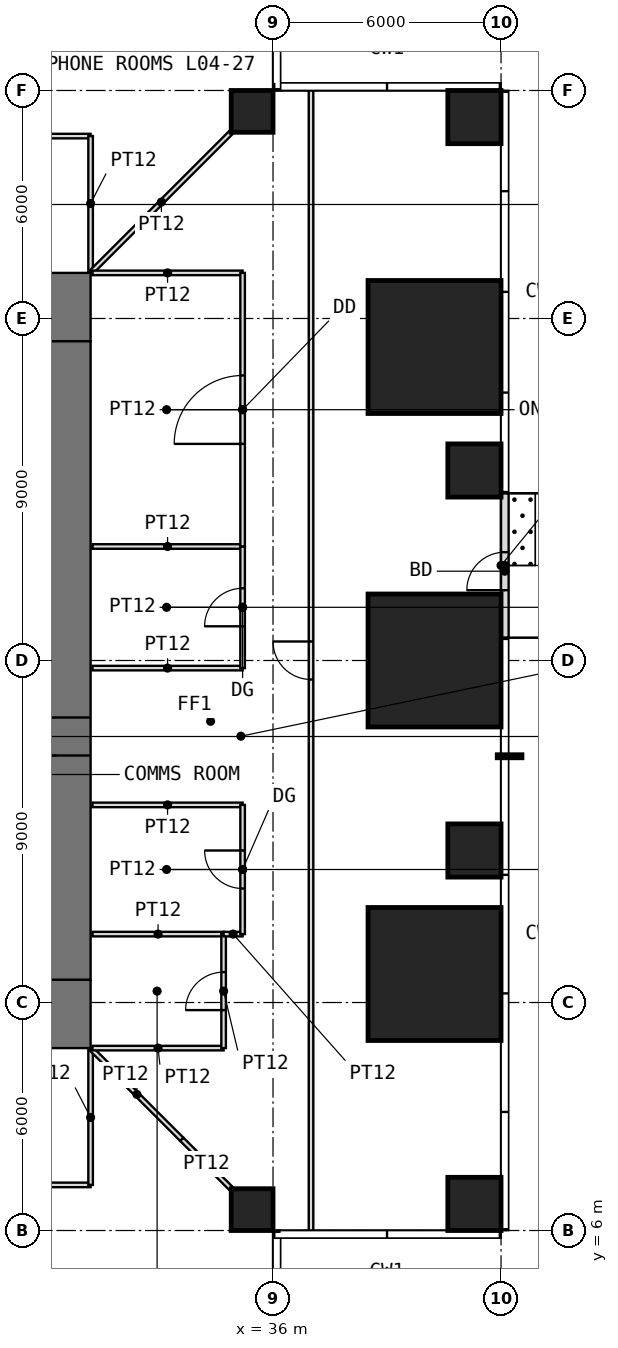
"""IFC4 building model, lengths in metres.
Left out: names, types, materials, properties, quantities, classifications, styles, units other than length and angle.
Written with IfcOpenShell. Run it as: python <this file> out.ifc"""

import sys

from ifc_helpers import new_model, si_unit, direction, frame, frame_2d, origin, origin_2d, place, context, subcontext, project, spatial, rectangle, extrude, element, fill, save


model = new_model("IFC4")
c1 = context("Model", 3, precision=1e-05, world=origin(), true_north=direction((0.0, 1.0)))
c2 = subcontext(c1, "Body", "Model", "MODEL_VIEW")
j1 = project(units=[si_unit("LENGTHUNIT", "METRE"), si_unit("PLANEANGLEUNIT", "RADIAN")], contexts=[c1])
p1 = place(None, origin())
s1 = spatial("IfcSite", under=j1, at=p1, CompositionType="ELEMENT")
p2 = place(p1, origin())
s2 = spatial("IfcBuilding", under=s1, at=p2, CompositionType="ELEMENT")
p3 = place(p2, frame((0.0, 0.0, 22.5)))
s3 = spatial("IfcBuildingStorey", under=s2, at=p3, CompositionType="ELEMENT", Elevation=22.5)
p4 = place(p3, frame((35.45, 6.55, 0.0), z_axis=(0.0, 0.0, 1.0), x_axis=(1.0, 0.0, 0.0)))
e1 = element("IfcColumn", 1, at=p4, inside=s3, PredefinedType="COLUMN", context=c2, shape_type="SweptSolid", body=[
    extrude(rectangle(XDim=1.1, YDim=1.1, at=origin_2d()), origin(), (0.0, 0.0, 1.0), 4.0),
])
p5 = place(p3, frame((41.3, 6.7, 0.0), z_axis=(0.0, 0.0, 1.0), x_axis=(1.0, 0.0, 0.0)))
e2 = element("IfcColumn", 2, at=p5, inside=s3, PredefinedType="COLUMN", context=c2, shape_type="SweptSolid", body=[
    extrude(rectangle(XDim=1.4, YDim=1.4, at=origin_2d()), origin(), (0.0, 0.0, 1.0), 4.0),
])
p6 = place(p3, frame((40.25, 12.75, 0.0), z_axis=(0.0, 0.0, 1.0), x_axis=(1.0, 0.0, 0.0)))
e3 = element("IfcColumn", 3, at=p6, inside=s3, PredefinedType="COLUMN", context=c2, shape_type="SweptSolid", body=[
    extrude(rectangle(XDim=3.5, YDim=3.5, at=origin_2d()), origin(), (0.0, 0.0, 1.0), 4.0),
])
p7 = place(p3, frame((41.3, 16.0, 0.0), z_axis=(0.0, 0.0, 1.0), x_axis=(1.0, 0.0, 0.0)))
e4 = element("IfcColumn", 4, at=p7, inside=s3, PredefinedType="COLUMN", context=c2, shape_type="SweptSolid", body=[
    extrude(rectangle(XDim=1.4, YDim=1.4, at=origin_2d()), origin(), (0.0, 0.0, 1.0), 4.0),
])
p8 = place(p3, frame((40.25, 21.0, 0.0), z_axis=(0.0, 0.0, 1.0), x_axis=(1.0, 0.0, 0.0)))
e5 = element("IfcColumn", 5, at=p8, inside=s3, PredefinedType="COLUMN", context=c2, shape_type="SweptSolid", body=[
    extrude(rectangle(XDim=3.5, YDim=3.5, at=origin_2d()), origin(), (0.0, 0.0, 1.0), 4.0),
])
p9 = place(p3, frame((41.3, 26.0, 0.0), z_axis=(0.0, 0.0, 1.0), x_axis=(1.0, 0.0, 0.0)))
e6 = element("IfcColumn", 6, at=p9, inside=s3, PredefinedType="COLUMN", context=c2, shape_type="SweptSolid", body=[
    extrude(rectangle(XDim=1.4, YDim=1.4, at=origin_2d()), origin(), (0.0, 0.0, 1.0), 4.0),
])
p10 = place(p3, frame((40.25, 29.25, 0.0), z_axis=(0.0, 0.0, 1.0), x_axis=(1.0, 0.0, 0.0)))
e7 = element("IfcColumn", 7, at=p10, inside=s3, PredefinedType="COLUMN", context=c2, shape_type="SweptSolid", body=[
    extrude(rectangle(XDim=3.5, YDim=3.5, at=origin_2d()), origin(), (0.0, 0.0, 1.0), 4.0),
])
p11 = place(p3, frame((35.45, 35.45, 0.0), z_axis=(0.0, 0.0, 1.0), x_axis=(1.0, 0.0, 0.0)))
e8 = element("IfcColumn", 8, at=p11, inside=s3, PredefinedType="COLUMN", context=c2, shape_type="SweptSolid", body=[
    extrude(rectangle(XDim=1.1, YDim=1.1, at=origin_2d()), origin(), (0.0, 0.0, 1.0), 4.0),
])
p12 = place(p3, frame((41.3, 35.3, 0.0), z_axis=(0.0, 0.0, 1.0), x_axis=(1.0, 0.0, 0.0)))
e9 = element("IfcColumn", 9, at=p12, inside=s3, PredefinedType="COLUMN", context=c2, shape_type="SweptSolid", body=[
    extrude(rectangle(XDim=1.4, YDim=1.4, at=origin_2d()), origin(), (0.0, 0.0, 1.0), 4.0),
])
p13 = place(p3, frame((42.1, 21.6, 0.0), z_axis=(0.0, 0.0, 1.0), x_axis=(0.0, 1.0, 0.0)))
e10 = element("IfcWall", 10, at=p13, inside=s3, PredefinedType="USERDEFINED", context=c2, shape_type="SweptSolid", body=[
    extrude(rectangle(XDim=3.8, YDim=0.2, at=frame_2d((1.9, 0.0))), origin(), (0.0, 0.0, 1.0), 3.75),
])
p14 = place(p13, frame((1.25, 0.0, 0.0)))
e11 = element("IfcOpeningElement", 11, at=p14, cuts=e10, PredefinedType="OPENING", context=c2, shape_type="SweptSolid", body=[
    extrude(rectangle(XDim=1.0, YDim=2.4, at=frame_2d((0.5, 1.2))), frame((0.0, 0.11, 0.0), z_axis=(0.0, -1.0, 0.0), x_axis=(1.0, 0.0, 0.0)), (0.0, 0.0, 1.0), 0.22),
])
p15 = place(p3, frame((10.8, 11.7, -0.05), z_axis=(0.0, 0.0, 1.0), x_axis=(1.0, 0.0, 0.0)))
e12 = element("IfcWall", 12, at=p15, inside=s3, PredefinedType="SHEAR", context=c2, shape_type="SweptSolid", body=[
    extrude(rectangle(XDim=20.4, YDim=1.8, at=frame_2d((10.2, 0.0))), origin(), (0.0, 0.0, 1.0), 4.0),
])
p16 = place(p15, frame((9.2, 0.0, 0.05)))
e13 = element("IfcOpeningElement", 13, at=p16, cuts=e12, PredefinedType="OPENING", context=c2, shape_type="SweptSolid", body=[
    extrude(rectangle(XDim=2.0, YDim=2.2, at=frame_2d((1.0, 1.1))), frame((0.0, 0.91, 0.0), z_axis=(0.0, -1.0, 0.0), x_axis=(1.0, 0.0, 0.0)), (0.0, 0.0, 1.0), 1.82),
])
p17 = place(p3, frame((10.8, 30.3, -0.05), z_axis=(0.0, 0.0, 1.0), x_axis=(1.0, 0.0, 0.0)))
e14 = element("IfcWall", 14, at=p17, inside=s3, PredefinedType="SHEAR", context=c2, shape_type="SweptSolid", body=[
    extrude(rectangle(XDim=20.4, YDim=1.8, at=frame_2d((10.2, 0.0))), origin(), (0.0, 0.0, 1.0), 4.0),
])
p18 = place(p17, frame((9.2, 0.0, 0.05)))
e15 = element("IfcOpeningElement", 15, at=p18, cuts=e14, PredefinedType="OPENING", context=c2, shape_type="SweptSolid", body=[
    extrude(rectangle(XDim=2.0, YDim=2.2, at=frame_2d((1.0, 1.1))), frame((0.0, 0.91, 0.0), z_axis=(0.0, -1.0, 0.0), x_axis=(1.0, 0.0, 0.0)), (0.0, 0.0, 1.0), 1.82),
])
p19 = place(p3, frame((30.3, 12.6, -0.05), z_axis=(0.0, 0.0, 1.0), x_axis=(0.0, 1.0, 0.0)))
e16 = element("IfcWall", 16, at=p19, inside=s3, PredefinedType="SHEAR", context=c2, shape_type="SweptSolid", body=[
    extrude(rectangle(XDim=16.8, YDim=1.8, at=frame_2d((8.4, 0.0))), origin(), (0.0, 0.0, 1.0), 4.0),
])
p20 = place(p19, frame((5.9, 0.0, 0.05)))
e17 = element("IfcOpeningElement", 17, at=p20, cuts=e16, PredefinedType="OPENING", context=c2, shape_type="SweptSolid", body=[
    extrude(rectangle(XDim=1.0, YDim=2.2, at=frame_2d((0.5, 1.1))), frame((0.0, 0.91, 0.0), z_axis=(0.0, -1.0, 0.0), x_axis=(1.0, 0.0, 0.0)), (0.0, 0.0, 1.0), 1.82),
])
p21 = place(p3, frame((23.6, 7.2, 0.0), z_axis=(0.0, 0.0, 1.0), x_axis=(1.0, 0.0, 0.0)))
e18 = element("IfcWall", 18, at=p21, inside=s3, PredefinedType="PARTITIONING", context=c2, shape_type="SweptSolid", body=[
    extrude(rectangle(XDim=7.6, YDim=0.12, at=frame_2d((3.8, 0.0))), origin(), (0.0, 0.0, 1.0), 3.75),
])
p22 = place(p21, frame((2.9, 0.0, 0.0)))
e19 = element("IfcOpeningElement", 19, at=p22, cuts=e18, PredefinedType="OPENING", context=c2, shape_type="SweptSolid", body=[
    extrude(rectangle(XDim=1.8, YDim=2.4, at=frame_2d((0.9, 1.2))), frame((0.0, 0.07, 0.0), z_axis=(0.0, -1.0, 0.0), x_axis=(1.0, 0.0, 0.0)), (0.0, 0.0, 1.0), 0.14),
])
p23 = place(p3, frame((27.0, 34.8, 0.0), z_axis=(0.0, 0.0, 1.0), x_axis=(1.0, 0.0, 0.0)))
e20 = element("IfcWall", 20, at=p23, inside=s3, PredefinedType="PARTITIONING", context=c2, shape_type="SweptSolid", body=[
    extrude(rectangle(XDim=4.2, YDim=0.12, at=frame_2d((2.1, 0.0))), origin(), (0.0, 0.0, 1.0), 3.75),
])
p24 = place(p23, frame((1.6, 0.0, 0.0)))
e21 = element("IfcOpeningElement", 21, at=p24, cuts=e20, PredefinedType="OPENING", context=c2, shape_type="SweptSolid", body=[
    extrude(rectangle(XDim=1.0, YDim=2.4, at=frame_2d((0.5, 1.2))), frame((0.0, 0.07, 0.0), z_axis=(0.0, -1.0, 0.0), x_axis=(1.0, 0.0, 0.0)), (0.0, 0.0, 1.0), 0.14),
])
for number, where, z_axis, x_axis in (
    (22, (31.2, 7.2, 0.0), (0.0, 0.0, 1.0), (0.0, 1.0, 0.0)),
    (23, (31.2, 31.25, 0.0), (0.0, 0.0, 1.0), (0.0, 1.0, 0.0)),
):
    element("IfcWall", number, at=place(p3, frame(where, z_axis=z_axis, x_axis=x_axis)), inside=s3, PredefinedType="PARTITIONING", context=c2, shape_type="SweptSolid", body=[
        extrude(rectangle(XDim=3.55, YDim=0.12, at=frame_2d((1.775, 0.0))), origin(), (0.0, 0.0, 1.0), 3.75),
    ])
p25 = place(p3, frame((31.235, 10.765, 0.0), z_axis=(0.0, 0.0, 1.0), x_axis=(0.707106781187, -0.707106781187, 0.0)))
e24 = element("IfcWall", 24, at=p25, inside=s3, PredefinedType="PARTITIONING", context=c2, shape_type="SweptSolid", body=[
    extrude(rectangle(XDim=3.346, YDim=0.12, at=frame_2d((1.673, 0.0))), origin(), (0.0, 0.0, 1.0), 3.75),
])
p26 = place(p3, frame((31.235, 31.235, 0.0), z_axis=(0.0, 0.0, 1.0), x_axis=(0.707106781187, 0.707106781187, 0.0)))
e25 = element("IfcWall", 25, at=p26, inside=s3, PredefinedType="PARTITIONING", context=c2, shape_type="SweptSolid", body=[
    extrude(rectangle(XDim=5.168, YDim=0.12, at=frame_2d((2.584, 0.0))), origin(), (0.0, 0.0, 1.0), 3.75),
])
for number, where, z_axis, x_axis in (
    (26, (31.25, 10.8, 0.0), (0.0, 0.0, 1.0), (1.0, 0.0, 0.0)),
    (27, (31.25, 13.8, 0.0), (0.0, 0.0, 1.0), (1.0, 0.0, 0.0)),
):
    element("IfcWall", number, at=place(p3, frame(where, z_axis=z_axis, x_axis=x_axis)), inside=s3, PredefinedType="PARTITIONING", context=c2, shape_type="SweptSolid", body=[
        extrude(rectangle(XDim=3.45, YDim=0.12, at=frame_2d((1.725, 0.0))), origin(), (0.0, 0.0, 1.0), 3.75),
    ])
for number, where, z_axis, x_axis in (
    (28, (31.25, 17.2, 0.0), (0.0, 0.0, 1.0), (1.0, 0.0, 0.0)),
    (29, (31.25, 20.8, 0.0), (0.0, 0.0, 1.0), (1.0, 0.0, 0.0)),
    (30, (31.25, 24.0, 0.0), (0.0, 0.0, 1.0), (1.0, 0.0, 0.0)),
    (31, (31.25, 31.2, 0.0), (0.0, 0.0, 1.0), (1.0, 0.0, 0.0)),
):
    element("IfcWall", number, at=place(p3, frame(where, z_axis=z_axis, x_axis=x_axis)), inside=s3, PredefinedType="PARTITIONING", context=c2, shape_type="SweptSolid", body=[
        extrude(rectangle(XDim=3.95, YDim=0.12, at=frame_2d((1.975, 0.0))), origin(), (0.0, 0.0, 1.0), 3.75),
    ])
p27 = place(p3, frame((33.602, 8.398, 0.0), z_axis=(0.0, 0.0, 1.0), x_axis=(0.707106781187, -0.707106781187, 0.0)))
e32 = element("IfcWall", 32, at=p27, inside=s3, PredefinedType="PARTITIONING", context=c2, shape_type="SweptSolid", body=[
    extrude(rectangle(XDim=1.822, YDim=0.12, at=frame_2d((0.911, 0.0))), origin(), (0.0, 0.0, 1.0), 3.75),
])
p28 = place(p3, frame((34.7, 10.8, 0.0), z_axis=(0.0, 0.0, 1.0), x_axis=(0.0, 1.0, 0.0)))
e33 = element("IfcWall", 33, at=p28, inside=s3, PredefinedType="PARTITIONING", context=c2, shape_type="SweptSolid", body=[
    extrude(rectangle(XDim=3.0, YDim=0.12, at=frame_2d((1.5, 0.0))), origin(), (0.0, 0.0, 1.0), 3.75),
])
p29 = place(p28, frame((1.0, 0.0, 0.0)))
e34 = element("IfcOpeningElement", 34, at=p29, cuts=e33, PredefinedType="OPENING", context=c2, shape_type="SweptSolid", body=[
    extrude(rectangle(XDim=1.0, YDim=2.2, at=frame_2d((0.5, 1.1))), frame((0.0, 0.07, 0.0), z_axis=(0.0, -1.0, 0.0), x_axis=(1.0, 0.0, 0.0)), (0.0, 0.0, 1.0), 0.14),
])
p30 = place(p3, frame((34.7, 13.8, 0.0), z_axis=(0.0, 0.0, 1.0), x_axis=(1.0, 0.0, 0.0)))
e35 = element("IfcWall", 35, at=p30, inside=s3, PredefinedType="PARTITIONING", context=c2, shape_type="SweptSolid", body=[
    extrude(rectangle(XDim=0.5, YDim=0.12, at=frame_2d((0.25, 0.0))), origin(), (0.0, 0.0, 1.0), 3.75),
])
p31 = place(p3, frame((35.2, 13.8, 0.0), z_axis=(0.0, 0.0, 1.0), x_axis=(0.0, 1.0, 0.0)))
e36 = element("IfcWall", 36, at=p31, inside=s3, PredefinedType="PARTITIONING", context=c2, shape_type="SweptSolid", body=[
    extrude(rectangle(XDim=3.4, YDim=0.12, at=frame_2d((1.7, 0.0))), origin(), (0.0, 0.0, 1.0), 3.75),
])
p32 = place(p31, frame((1.2, 0.0, 0.0)))
e37 = element("IfcOpeningElement", 37, at=p32, cuts=e36, PredefinedType="OPENING", context=c2, shape_type="SweptSolid", body=[
    extrude(rectangle(XDim=1.0, YDim=2.4, at=frame_2d((0.5, 1.2))), frame((0.0, 0.07, 0.0), z_axis=(0.0, -1.0, 0.0), x_axis=(1.0, 0.0, 0.0)), (0.0, 0.0, 1.0), 0.14),
])
p33 = place(p3, frame((35.2, 20.8, 0.0), z_axis=(0.0, 0.0, 1.0), x_axis=(0.0, 1.0, 0.0)))
e38 = element("IfcWall", 38, at=p33, inside=s3, PredefinedType="PARTITIONING", context=c2, shape_type="SweptSolid", body=[
    extrude(rectangle(XDim=3.2, YDim=0.12, at=frame_2d((1.6, 0.0))), origin(), (0.0, 0.0, 1.0), 3.75),
])
p34 = place(p33, frame((1.1, 0.0, 0.0)))
e39 = element("IfcOpeningElement", 39, at=p34, cuts=e38, PredefinedType="OPENING", context=c2, shape_type="SweptSolid", body=[
    extrude(rectangle(XDim=1.0, YDim=2.4, at=frame_2d((0.5, 1.2))), frame((0.0, 0.07, 0.0), z_axis=(0.0, -1.0, 0.0), x_axis=(1.0, 0.0, 0.0)), (0.0, 0.0, 1.0), 0.14),
])
p35 = place(p3, frame((35.2, 24.0, 0.0), z_axis=(0.0, 0.0, 1.0), x_axis=(0.0, 1.0, 0.0)))
e40 = element("IfcWall", 40, at=p35, inside=s3, PredefinedType="PARTITIONING", context=c2, shape_type="SweptSolid", body=[
    extrude(rectangle(XDim=7.2, YDim=0.12, at=frame_2d((3.6, 0.0))), origin(), (0.0, 0.0, 1.0), 3.75),
])
p36 = place(p35, frame((2.7, 0.0, 0.0)))
e41 = element("IfcOpeningElement", 41, at=p36, cuts=e40, PredefinedType="OPENING", context=c2, shape_type="SweptSolid", body=[
    extrude(rectangle(XDim=1.8, YDim=2.4, at=frame_2d((0.9, 1.2))), frame((0.0, 0.07, 0.0), z_axis=(0.0, -1.0, 0.0), x_axis=(1.0, 0.0, 0.0)), (0.0, 0.0, 1.0), 0.14),
])
p37 = place(p3, frame((37.0, 6.0, 0.0), z_axis=(0.0, 0.0, 1.0), x_axis=(0.0, 1.0, 0.0)))
e42 = element("IfcWall", 42, at=p37, inside=s3, PredefinedType="PARTITIONING", context=c2, shape_type="SweptSolid", body=[
    extrude(rectangle(XDim=30.0, YDim=0.12, at=frame_2d((15.0, 0.0))), origin(), (0.0, 0.0, 1.0), 3.75),
])
p38 = place(p37, frame((14.5, 0.0, 0.0)))
e43 = element("IfcOpeningElement", 43, at=p38, cuts=e42, PredefinedType="OPENING", context=c2, shape_type="SweptSolid", body=[
    extrude(rectangle(XDim=1.0, YDim=2.4, at=frame_2d((0.5, 1.2))), frame((0.0, 0.07, 0.0), z_axis=(0.0, -1.0, 0.0), x_axis=(1.0, 0.0, 0.0)), (0.0, 0.0, 1.0), 0.14),
])
p39 = place(p14, origin())
e44 = element("IfcDoor", 44, at=p39, inside=s3, OperationType="SINGLE_SWING_LEFT", PredefinedType="DOOR", context=c2, shape_type="SweptSolid", body=[
    extrude(rectangle(XDim=1.0, YDim=2.4, at=frame_2d((0.5, 1.2))), frame((0.0, 0.025, 0.0), z_axis=(0.0, -1.0, 0.0), x_axis=(1.0, 0.0, 0.0)), (0.0, 0.0, 1.0), 0.05),
])
fill(e11, e44)
p40 = place(p20, origin())
e45 = element("IfcDoor", 45, at=p40, inside=s3, OperationType="SINGLE_SWING_LEFT", PredefinedType="DOOR", context=c2, shape_type="SweptSolid", body=[
    extrude(rectangle(XDim=1.0, YDim=2.2, at=frame_2d((0.5, 1.1))), frame((0.0, 0.025, 0.0), z_axis=(0.0, -1.0, 0.0), x_axis=(1.0, 0.0, 0.0)), (0.0, 0.0, 1.0), 0.05),
])
fill(e17, e45)
p41 = place(p29, origin())
e46 = element("IfcDoor", 46, at=p41, inside=s3, OperationType="SINGLE_SWING_LEFT", PredefinedType="DOOR", context=c2, shape_type="SweptSolid", body=[
    extrude(rectangle(XDim=1.0, YDim=2.2, at=frame_2d((0.5, 1.1))), frame((0.0, 0.025, 0.0), z_axis=(0.0, -1.0, 0.0), x_axis=(1.0, 0.0, 0.0)), (0.0, 0.0, 1.0), 0.05),
])
fill(e34, e46)
p42 = place(p32, origin())
e47 = element("IfcDoor", 47, at=p42, inside=s3, OperationType="SINGLE_SWING_RIGHT", PredefinedType="DOOR", context=c2, shape_type="SweptSolid", body=[
    extrude(rectangle(XDim=1.0, YDim=2.4, at=frame_2d((0.5, 1.2))), frame((0.0, 0.025, 0.0), z_axis=(0.0, -1.0, 0.0), x_axis=(1.0, 0.0, 0.0)), (0.0, 0.0, 1.0), 0.05),
])
fill(e37, e47)
p43 = place(p34, origin())
e48 = element("IfcDoor", 48, at=p43, inside=s3, OperationType="SINGLE_SWING_LEFT", PredefinedType="DOOR", context=c2, shape_type="SweptSolid", body=[
    extrude(rectangle(XDim=1.0, YDim=2.4, at=frame_2d((0.5, 1.2))), frame((0.0, 0.025, 0.0), z_axis=(0.0, -1.0, 0.0), x_axis=(1.0, 0.0, 0.0)), (0.0, 0.0, 1.0), 0.05),
])
fill(e39, e48)
p44 = place(p36, origin())
e49 = element("IfcDoor", 49, at=p44, inside=s3, OperationType="DOUBLE_DOOR_SINGLE_SWING", PredefinedType="DOOR", context=c2, shape_type="SweptSolid", body=[
    extrude(rectangle(XDim=1.8, YDim=2.4, at=frame_2d((0.9, 1.2))), frame((0.0, 0.025, 0.0), z_axis=(0.0, -1.0, 0.0), x_axis=(1.0, 0.0, 0.0)), (0.0, 0.0, 1.0), 0.05),
])
fill(e41, e49)
p45 = place(p38, origin())
e50 = element("IfcDoor", 50, at=p45, inside=s3, OperationType="SINGLE_SWING_RIGHT", PredefinedType="DOOR", context=c2, shape_type="SweptSolid", body=[
    extrude(rectangle(XDim=1.0, YDim=2.4, at=frame_2d((0.5, 1.2))), frame((0.0, 0.025, 0.0), z_axis=(0.0, -1.0, 0.0), x_axis=(1.0, 0.0, 0.0)), (0.0, 0.0, 1.0), 0.05),
])
fill(e43, e50)
save(model, sys.argv[1])
